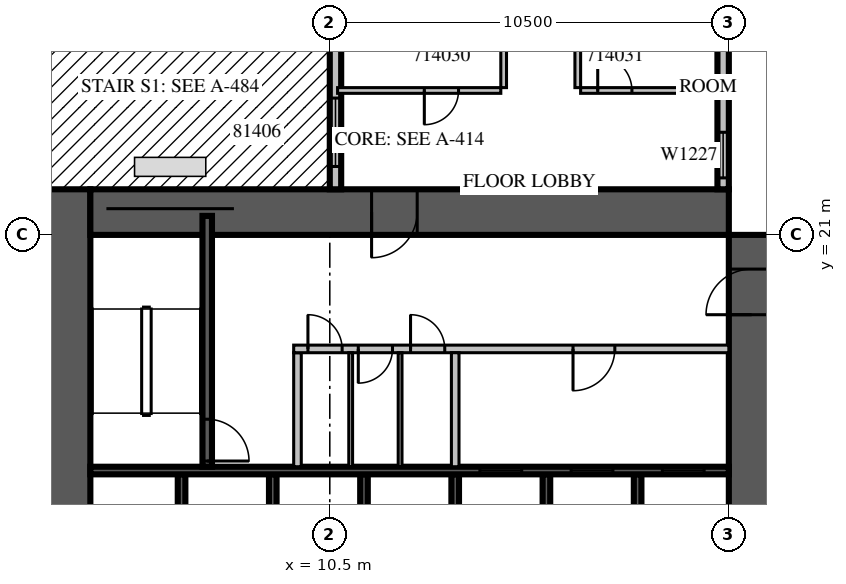
"""IFC4 building model, lengths in metres.
Left out: names, types, materials, properties, quantities, classifications, styles, units other than length and angle.
Written with IfcOpenShell. Run it as: python <this file> out.ifc"""

import sys

from ifc_helpers import new_model, si_unit, direction, frame, frame_2d, origin, place, context, subcontext, project, spatial, rectangle, extrude, source, transform, mapped, element, fill, save


model = new_model("IFC4")
c1 = context("Model", 3, precision=1e-05, world=origin(), true_north=direction((0.0, 1.0)))
c2 = subcontext(c1, "Body", "Model", "MODEL_VIEW")
j1 = project(units=[si_unit("LENGTHUNIT", "METRE"), si_unit("PLANEANGLEUNIT", "RADIAN")], contexts=[c1])
p1 = place(None, origin())
s1 = spatial("IfcSite", under=j1, at=p1, CompositionType="ELEMENT")
p2 = place(p1, origin())
s2 = spatial("IfcBuilding", under=s1, at=p2, CompositionType="ELEMENT")
p3 = place(p2, frame((0.0, 0.0, 69.9)))
s3 = spatial("IfcBuildingStorey", under=s2, at=p3, CompositionType="ELEMENT", Elevation=69.9)
m1 = source(origin(), c2, "Body", "SweptSolid", [
    extrude(rectangle(XDim=18.0, YDim=1.2, at=frame_2d((9.0, 0.0))), origin(), (0.0, 0.0, 1.0), 4.2),
])
p4 = place(p3, frame((3.6, 4.2, 0.0), z_axis=(0.0, 0.0, 1.0), x_axis=(0.0, 1.0, 0.0)))
e1 = element("IfcWall", 1, at=p4, inside=s3, PredefinedType="SHEAR", context=c2, shape_type="MappedRepresentation", body=[
    mapped(m1, transform((0.0, 0.0, 0.0), scale=1.0)),
])
m2 = source(origin(), c2, "Body", "SweptSolid", [
    extrude(rectangle(XDim=2.2, YDim=2.1, at=frame_2d((1.1, 1.05))), frame((0.0, 0.61, 0.0), z_axis=(0.0, -1.0, 0.0), x_axis=(1.0, 0.0, 0.0)), (0.0, 0.0, 1.0), 1.22),
])
p5 = place(p4, frame((4.2, 0.0, 0.0)))
e2 = element("IfcOpeningElement", 2, at=p5, cuts=e1, PredefinedType="OPENING", context=c2, shape_type="MappedRepresentation", body=[
    mapped(m2, transform((0.0, 0.0, 0.0), scale=1.0)),
])
m3 = source(origin(), c2, "Body", "SweptSolid", [
    extrude(rectangle(XDim=16.8, YDim=1.2, at=frame_2d((8.4, 0.0))), origin(), (0.0, 0.0, 1.0), 4.2),
])
p6 = place(p3, frame((21.6, 4.2, 0.0), z_axis=(0.0, 0.0, 1.0), x_axis=(0.0, 1.0, 0.0)))
e3 = element("IfcWall", 3, at=p6, inside=s3, PredefinedType="SHEAR", context=c2, shape_type="MappedRepresentation", body=[
    mapped(m3, transform((0.0, 0.0, 0.0), scale=1.0)),
])
p7 = place(p6, frame((4.2, 0.0, 0.0)))
e4 = element("IfcOpeningElement", 4, at=p7, cuts=e3, PredefinedType="OPENING", context=c2, shape_type="MappedRepresentation", body=[
    mapped(m2, transform((0.0, 0.0, 0.0), scale=1.0)),
])
m4 = source(origin(), c2, "Body", "SweptSolid", [
    extrude(rectangle(XDim=1.2, YDim=2.1, at=frame_2d((0.6, 1.05))), frame((0.0, 0.61, 0.0), z_axis=(0.0, -1.0, 0.0), x_axis=(1.0, 0.0, 0.0)), (0.0, 0.0, 1.0), 1.22),
])
p8 = place(p6, frame((14.7, 0.0, 0.0)))
e5 = element("IfcOpeningElement", 5, at=p8, cuts=e3, PredefinedType="OPENING", context=c2, shape_type="MappedRepresentation", body=[
    mapped(m4, transform((0.0, 0.0, 0.0), scale=1.0)),
])
p9 = place(p3, frame((4.2, 21.6, 0.0), z_axis=(0.0, 0.0, 1.0), x_axis=(1.0, 0.0, 0.0)))
e6 = element("IfcWall", 6, at=p9, inside=s3, PredefinedType="SHEAR", context=c2, shape_type="MappedRepresentation", body=[
    mapped(m3, transform((0.0, 0.0, 0.0), scale=1.0)),
])
p10 = place(p9, frame((7.4, 0.0, 0.0)))
e7 = element("IfcOpeningElement", 7, at=p10, cuts=e6, PredefinedType="OPENING", context=c2, shape_type="MappedRepresentation", body=[
    mapped(m4, transform((0.0, 0.0, 0.0), scale=1.0)),
])
m5 = source(origin(), c2, "Body", "SweptSolid", [
    extrude(rectangle(XDim=6.6, YDim=0.3, at=frame_2d((3.3, 0.0))), origin(), (0.0, 0.0, 1.0), 3.8),
])
p11 = place(p3, frame((20.85, 22.2, 0.0), z_axis=(0.0, 0.0, 1.0), x_axis=(0.0, 1.0, 0.0)))
e8 = element("IfcWall", 8, at=p11, inside=s3, PredefinedType="STANDARD", context=c2, shape_type="MappedRepresentation", body=[
    mapped(m5, transform((0.0, 0.0, 0.0), scale=1.0)),
])
m6 = source(origin(), c2, "Body", "SweptSolid", [
    extrude(rectangle(XDim=1.2, YDim=2.7, at=frame_2d((0.6, 1.35))), frame((0.0, 0.16, 0.0), z_axis=(0.0, -1.0, 0.0), x_axis=(1.0, 0.0, 0.0)), (0.0, 0.0, 1.0), 0.32),
])
p12 = place(p11, frame((0.3, 0.0, 0.6)))
e9 = element("IfcOpeningElement", 9, at=p12, cuts=e8, PredefinedType="OPENING", context=c2, shape_type="MappedRepresentation", body=[
    mapped(m6, transform((0.0, 0.0, 0.0), scale=1.0)),
])
m7 = source(origin(), c2, "Body", "SweptSolid", [
    extrude(rectangle(XDim=2.4, YDim=2.7, at=frame_2d((1.2, 1.35))), frame((0.0, 0.16, 0.0), z_axis=(0.0, -1.0, 0.0), x_axis=(1.0, 0.0, 0.0)), (0.0, 0.0, 1.0), 0.32),
])
p13 = place(p11, frame((3.9, 0.0, 0.6)))
e10 = element("IfcOpeningElement", 10, at=p13, cuts=e8, PredefinedType="OPENING", context=c2, shape_type="MappedRepresentation", body=[
    mapped(m7, transform((0.0, 0.0, 0.0), scale=1.0)),
])
p14 = place(p3, frame((10.65, 28.8, 0.0), z_axis=(0.0, 0.0, 1.0), x_axis=(0.0, -1.0, 0.0)))
e11 = element("IfcWall", 11, at=p14, inside=s3, PredefinedType="STANDARD", context=c2, shape_type="MappedRepresentation", body=[
    mapped(m5, transform((0.0, 0.0, 0.0), scale=1.0)),
])
m8 = source(origin(), c2, "Body", "SweptSolid", [
    extrude(rectangle(XDim=1.8, YDim=2.4, at=frame_2d((0.9, 1.2))), frame((0.0, 0.16, 0.0), z_axis=(0.0, -1.0, 0.0), x_axis=(1.0, 0.0, 0.0)), (0.0, 0.0, 1.0), 0.32),
])
p15 = place(p14, frame((0.1, 0.0, 0.0)))
e12 = element("IfcOpeningElement", 12, at=p15, cuts=e11, PredefinedType="OPENING", context=c2, shape_type="MappedRepresentation", body=[
    mapped(m8, transform((0.0, 0.0, 0.0), scale=1.0)),
])
p16 = place(p14, frame((4.2, 0.0, 0.0)))
e13 = element("IfcOpeningElement", 13, at=p16, cuts=e11, PredefinedType="OPENING", context=c2, shape_type="MappedRepresentation", body=[
    mapped(m8, transform((0.0, 0.0, 0.0), scale=1.0)),
])
m9 = source(origin(), c2, "Body", "SweptSolid", [
    extrude(rectangle(XDim=3.0, YDim=0.2, at=frame_2d((1.5, 0.0))), origin(), (0.0, 0.0, 1.0), 4.2),
])
for number, where, z_axis, x_axis in (
    (14, (6.6, 11.7, 0.0), (0.0, 0.0, 1.0), (0.0, 1.0, 0.0)),
    (15, (9.0, 11.7, 0.0), (0.0, 0.0, 1.0), (0.0, 1.0, 0.0)),
    (16, (11.4, 11.7, 0.0), (0.0, 0.0, 1.0), (0.0, 1.0, 0.0)),
    (17, (13.8, 11.7, 0.0), (0.0, 0.0, 1.0), (0.0, 1.0, 0.0)),
    (18, (16.2, 11.7, 0.0), (0.0, 0.0, 1.0), (0.0, 1.0, 0.0)),
    (19, (18.6, 11.7, 0.0), (0.0, 0.0, 1.0), (0.0, 1.0, 0.0)),
):
    element("IfcWall", number, at=place(p3, frame(where, z_axis=z_axis, x_axis=x_axis)), inside=s3, PredefinedType="SOLIDWALL", context=c2, shape_type="MappedRepresentation", body=[
        mapped(m9, transform((0.0, 0.0, 0.0), scale=1.0)),
    ])
m10 = source(origin(), c2, "Body", "SweptSolid", [
    extrude(rectangle(XDim=16.8, YDim=0.2, at=frame_2d((8.4, 0.0))), origin(), (0.0, 0.0, 1.0), 4.2),
])
p17 = place(p3, frame((4.2, 14.8, 0.0), z_axis=(0.0, 0.0, 1.0), x_axis=(1.0, 0.0, 0.0)))
e20 = element("IfcWall", 20, at=p17, inside=s3, PredefinedType="SOLIDWALL", context=c2, shape_type="MappedRepresentation", body=[
    mapped(m10, transform((0.0, 0.0, 0.0), scale=1.0)),
])
m11 = source(origin(), c2, "Body", "SweptSolid", [
    extrude(rectangle(XDim=1.1, YDim=2.1, at=frame_2d((0.55, 1.05))), frame((0.0, 0.11, 0.0), z_axis=(0.0, -1.0, 0.0), x_axis=(1.0, 0.0, 0.0)), (0.0, 0.0, 1.0), 0.22),
])
p18 = place(p17, frame((10.25, 0.0, 0.0)))
e21 = element("IfcOpeningElement", 21, at=p18, cuts=e20, PredefinedType="OPENING", context=c2, shape_type="MappedRepresentation", body=[
    mapped(m11, transform((0.0, 0.0, 0.0), scale=1.0)),
])
p19 = place(p17, frame((12.65, 0.0, 0.0)))
e22 = element("IfcOpeningElement", 22, at=p19, cuts=e20, PredefinedType="OPENING", context=c2, shape_type="MappedRepresentation", body=[
    mapped(m11, transform((0.0, 0.0, 0.0), scale=1.0)),
])
p20 = place(p17, frame((15.05, 0.0, 0.0)))
e23 = element("IfcOpeningElement", 23, at=p20, cuts=e20, PredefinedType="OPENING", context=c2, shape_type="MappedRepresentation", body=[
    mapped(m11, transform((0.0, 0.0, 0.0), scale=1.0)),
])
m12 = source(origin(), c2, "Body", "SweptSolid", [
    extrude(rectangle(XDim=6.6, YDim=0.25, at=frame_2d((3.3, 0.0))), origin(), (0.0, 0.0, 1.0), 3.8),
])
p21 = place(p3, frame((7.275, 14.9, 0.0), z_axis=(0.0, 0.0, 1.0), x_axis=(0.0, 1.0, 0.0)))
e24 = element("IfcWall", 24, at=p21, inside=s3, PredefinedType="SOLIDWALL", context=c2, shape_type="MappedRepresentation", body=[
    mapped(m12, transform((0.0, 0.0, 0.0), scale=1.0)),
])
m13 = source(origin(), c2, "Body", "SweptSolid", [
    extrude(rectangle(XDim=1.1, YDim=2.1, at=frame_2d((0.55, 1.05))), frame((0.0, 0.135, 0.0), z_axis=(0.0, -1.0, 0.0), x_axis=(1.0, 0.0, 0.0)), (0.0, 0.0, 1.0), 0.27),
])
p22 = place(p21, frame((0.15, 0.0, 0.0)))
e25 = element("IfcOpeningElement", 25, at=p22, cuts=e24, PredefinedType="OPENING", context=c2, shape_type="MappedRepresentation", body=[
    mapped(m13, transform((0.0, 0.0, 0.0), scale=1.0)),
])
m14 = source(origin(), c2, "Body", "SweptSolid", [
    extrude(rectangle(XDim=3.0, YDim=0.2, at=frame_2d((1.5, 0.0))), origin(), (0.0, 0.0, 1.0), 3.8),
])
p23 = place(p3, frame((9.65, 14.9, 0.0), z_axis=(0.0, 0.0, 1.0), x_axis=(0.0, 1.0, 0.0)))
e26 = element("IfcWall", 26, at=p23, inside=s3, PredefinedType="PARTITIONING", context=c2, shape_type="MappedRepresentation", body=[
    mapped(m14, transform((0.0, 0.0, 0.0), scale=1.0)),
])
m15 = source(origin(), c2, "Body", "SweptSolid", [
    extrude(rectangle(XDim=11.45, YDim=0.2, at=frame_2d((5.725, 0.0))), origin(), (0.0, 0.0, 1.0), 3.8),
])
p24 = place(p3, frame((9.55, 18.0, 0.0), z_axis=(0.0, 0.0, 1.0), x_axis=(1.0, 0.0, 0.0)))
e27 = element("IfcWall", 27, at=p24, inside=s3, PredefinedType="PARTITIONING", context=c2, shape_type="MappedRepresentation", body=[
    mapped(m15, transform((0.0, 0.0, 0.0), scale=1.0)),
])
m16 = source(origin(), c2, "Body", "SweptSolid", [
    extrude(rectangle(XDim=0.9, YDim=2.1, at=frame_2d((0.45, 1.05))), frame((0.0, 0.11, 0.0), z_axis=(0.0, -1.0, 0.0), x_axis=(1.0, 0.0, 0.0)), (0.0, 0.0, 1.0), 0.22),
])
p25 = place(p24, frame((0.375, 0.0, 0.0)))
e28 = element("IfcOpeningElement", 28, at=p25, cuts=e27, PredefinedType="OPENING", context=c2, shape_type="MappedRepresentation", body=[
    mapped(m16, transform((0.0, 0.0, 0.0), scale=1.0)),
])
p26 = place(p24, frame((1.7, 0.0, 0.0)))
e29 = element("IfcOpeningElement", 29, at=p26, cuts=e27, PredefinedType="OPENING", context=c2, shape_type="MappedRepresentation", body=[
    mapped(m16, transform((0.0, 0.0, 0.0), scale=1.0)),
])
p27 = place(p24, frame((3.075, 0.0, 0.0)))
e30 = element("IfcOpeningElement", 30, at=p27, cuts=e27, PredefinedType="OPENING", context=c2, shape_type="MappedRepresentation", body=[
    mapped(m16, transform((0.0, 0.0, 0.0), scale=1.0)),
])
p28 = place(p24, frame((7.35, 0.0, 0.0)))
e31 = element("IfcOpeningElement", 31, at=p28, cuts=e27, PredefinedType="OPENING", context=c2, shape_type="MappedRepresentation", body=[
    mapped(m11, transform((0.0, 0.0, 0.0), scale=1.0)),
])
p29 = place(p3, frame((13.8, 14.9, 0.0), z_axis=(0.0, 0.0, 1.0), x_axis=(0.0, 1.0, 0.0)))
e32 = element("IfcWall", 32, at=p29, inside=s3, PredefinedType="PARTITIONING", context=c2, shape_type="MappedRepresentation", body=[
    mapped(m14, transform((0.0, 0.0, 0.0), scale=1.0)),
])
m17 = source(origin(), c2, "Body", "SweptSolid", [
    extrude(rectangle(XDim=3.0, YDim=0.1, at=frame_2d((1.5, 0.0))), origin(), (0.0, 0.0, 1.0), 3.8),
])
for number, where, z_axis, x_axis in (
    (33, (11.05, 14.9, 0.0), (0.0, 0.0, 1.0), (0.0, 1.0, 0.0)),
    (34, (12.35, 14.9, 0.0), (0.0, 0.0, 1.0), (0.0, 1.0, 0.0)),
):
    element("IfcWall", number, at=place(p3, frame(where, z_axis=z_axis, x_axis=x_axis)), inside=s3, PredefinedType="PARTITIONING", context=c2, shape_type="MappedRepresentation", body=[
        mapped(m17, transform((0.0, 0.0, 0.0), scale=1.0)),
    ])
m18 = source(origin(), c2, "Body", "SweptSolid", [
    extrude(rectangle(XDim=4.295, YDim=0.15, at=frame_2d((2.147, 0.0))), origin(), (0.0, 0.0, 1.0), 3.8),
])
p30 = place(p3, frame((10.705, 24.8, 0.0), z_axis=(0.0, 0.0, 1.0), x_axis=(1.0, 0.0, 0.0)))
e35 = element("IfcWall", 35, at=p30, inside=s3, PredefinedType="PARTITIONING", context=c2, shape_type="MappedRepresentation", body=[
    mapped(m18, transform((0.0, 0.0, 0.0), scale=1.0)),
])
m19 = source(origin(), c2, "Body", "SweptSolid", [
    extrude(rectangle(XDim=0.9, YDim=2.1, at=frame_2d((0.45, 1.05))), frame((0.0, 0.085, 0.0), z_axis=(0.0, -1.0, 0.0), x_axis=(1.0, 0.0, 0.0)), (0.0, 0.0, 1.0), 0.17),
])
p31 = place(p30, frame((2.283, 0.0, 0.0)))
e36 = element("IfcOpeningElement", 36, at=p31, cuts=e35, PredefinedType="OPENING", context=c2, shape_type="MappedRepresentation", body=[
    mapped(m19, transform((0.0, 0.0, 0.0), scale=1.0)),
])
m20 = source(origin(), c2, "Body", "SweptSolid", [
    extrude(rectangle(XDim=3.6, YDim=0.15, at=frame_2d((1.8, 0.0))), origin(), (0.0, 0.0, 1.0), 3.8),
])
p32 = place(p3, frame((17.1, 24.8, 0.0), z_axis=(0.0, 0.0, 1.0), x_axis=(1.0, 0.0, 0.0)))
e37 = element("IfcWall", 37, at=p32, inside=s3, PredefinedType="PARTITIONING", context=c2, shape_type="MappedRepresentation", body=[
    mapped(m20, transform((0.0, 0.0, 0.0), scale=1.0)),
])
p33 = place(p32, frame((0.45, 0.0, 0.0)))
e38 = element("IfcOpeningElement", 38, at=p33, cuts=e37, PredefinedType="OPENING", context=c2, shape_type="MappedRepresentation", body=[
    mapped(m19, transform((0.0, 0.0, 0.0), scale=1.0)),
])
m21 = source(origin(), c2, "Body", "SweptSolid", [
    extrude(rectangle(XDim=4.45, YDim=0.15, at=frame_2d((2.225, 0.0))), origin(), (0.0, 0.0, 1.0), 3.8),
])
for number, where, z_axis, x_axis in (
    (39, (15.075, 24.875, 0.0), (0.0, 0.0, 1.0), (0.0, 1.0, 0.0)),
    (40, (17.025, 29.325, 0.0), (0.0, 0.0, 1.0), (0.0, -1.0, 0.0)),
):
    element("IfcWall", number, at=place(p3, frame(where, z_axis=z_axis, x_axis=x_axis)), inside=s3, PredefinedType="PARTITIONING", context=c2, shape_type="MappedRepresentation", body=[
        mapped(m21, transform((0.0, 0.0, 0.0), scale=1.0)),
    ])
m22 = source(origin(), c2, "Body", "SweptSolid", [
    extrude(rectangle(XDim=1.2, YDim=2.7, at=frame_2d((0.6, 1.35))), frame((0.0, 0.03, 0.0), z_axis=(0.0, -1.0, 0.0), x_axis=(1.0, 0.0, 0.0)), (0.0, 0.0, 1.0), 0.06),
])
p34 = place(p12, origin())
e41 = element("IfcWindow", 41, at=p34, inside=s3, PartitioningType="SINGLE_PANEL", PredefinedType="WINDOW", context=c2, shape_type="MappedRepresentation", body=[
    mapped(m22, transform((0.0, 0.0, 0.0), scale=1.0)),
])
fill(e9, e41)
m23 = source(origin(), c2, "Body", "SweptSolid", [
    extrude(rectangle(XDim=1.8, YDim=2.4, at=frame_2d((0.9, 1.2))), frame((0.0, 0.025, 0.0), z_axis=(0.0, -1.0, 0.0), x_axis=(1.0, 0.0, 0.0)), (0.0, 0.0, 1.0), 0.05),
])
p35 = place(p16, origin())
e42 = element("IfcDoor", 42, at=p35, inside=s3, OperationType="SLIDING_TO_LEFT", PredefinedType="DOOR", context=c2, shape_type="MappedRepresentation", body=[
    mapped(m23, transform((0.0, 0.0, 0.0), scale=1.0)),
])
fill(e13, e42)
m24 = source(origin(), c2, "Body", "SweptSolid", [
    extrude(rectangle(XDim=1.1, YDim=2.1, at=frame_2d((0.55, 1.05))), frame((0.0, 0.025, 0.0), z_axis=(0.0, -1.0, 0.0), x_axis=(1.0, 0.0, 0.0)), (0.0, 0.0, 1.0), 0.05),
])
p36 = place(p18, origin())
e43 = element("IfcDoor", 43, at=p36, inside=s3, OperationType="SLIDING_TO_LEFT", PredefinedType="DOOR", context=c2, shape_type="MappedRepresentation", body=[
    mapped(m24, transform((0.0, 0.0, 0.0), scale=1.0)),
])
fill(e21, e43)
p37 = place(p19, origin())
e44 = element("IfcDoor", 44, at=p37, inside=s3, OperationType="SLIDING_TO_LEFT", PredefinedType="DOOR", context=c2, shape_type="MappedRepresentation", body=[
    mapped(m24, transform((0.0, 0.0, 0.0), scale=1.0)),
])
fill(e22, e44)
p38 = place(p20, origin())
e45 = element("IfcDoor", 45, at=p38, inside=s3, OperationType="SLIDING_TO_LEFT", PredefinedType="DOOR", context=c2, shape_type="MappedRepresentation", body=[
    mapped(m24, transform((0.0, 0.0, 0.0), scale=1.0)),
])
fill(e23, e45)
p39 = place(p22, origin())
e46 = element("IfcDoor", 46, at=p39, inside=s3, OperationType="SINGLE_SWING_RIGHT", PredefinedType="DOOR", context=c2, shape_type="MappedRepresentation", body=[
    mapped(m24, transform((0.0, 0.0, 0.0), scale=1.0)),
])
fill(e25, e46)
m25 = source(origin(), c2, "Body", "SweptSolid", [
    extrude(rectangle(XDim=0.9, YDim=2.1, at=frame_2d((0.45, 1.05))), frame((0.0, 0.025, 0.0), z_axis=(0.0, -1.0, 0.0), x_axis=(1.0, 0.0, 0.0)), (0.0, 0.0, 1.0), 0.05),
])
p40 = place(p25, origin())
e47 = element("IfcDoor", 47, at=p40, inside=s3, OperationType="SINGLE_SWING_LEFT", PredefinedType="DOOR", context=c2, shape_type="MappedRepresentation", body=[
    mapped(m25, transform((0.0, 0.0, 0.0), scale=1.0)),
])
fill(e28, e47)
p41 = place(p26, origin())
e48 = element("IfcDoor", 48, at=p41, inside=s3, OperationType="SINGLE_SWING_RIGHT", PredefinedType="DOOR", context=c2, shape_type="MappedRepresentation", body=[
    mapped(m25, transform((0.0, 0.0, 0.0), scale=1.0)),
])
fill(e29, e48)
p42 = place(p27, origin())
e49 = element("IfcDoor", 49, at=p42, inside=s3, OperationType="SINGLE_SWING_LEFT", PredefinedType="DOOR", context=c2, shape_type="MappedRepresentation", body=[
    mapped(m25, transform((0.0, 0.0, 0.0), scale=1.0)),
])
fill(e30, e49)
p43 = place(p28, origin())
e50 = element("IfcDoor", 50, at=p43, inside=s3, OperationType="SINGLE_SWING_RIGHT", PredefinedType="DOOR", context=c2, shape_type="MappedRepresentation", body=[
    mapped(m24, transform((0.0, 0.0, 0.0), scale=1.0)),
])
fill(e31, e50)
m26 = source(origin(), c2, "Body", "SweptSolid", [
    extrude(rectangle(XDim=1.2, YDim=2.1, at=frame_2d((0.6, 1.05))), frame((0.0, 0.025, 0.0), z_axis=(0.0, -1.0, 0.0), x_axis=(1.0, 0.0, 0.0)), (0.0, 0.0, 1.0), 0.05),
])
p44 = place(p10, origin())
e51 = element("IfcDoor", 51, at=p44, inside=s3, OperationType="SINGLE_SWING_RIGHT", PredefinedType="DOOR", context=c2, shape_type="MappedRepresentation", body=[
    mapped(m26, transform((0.0, 0.0, 0.0), scale=1.0)),
])
fill(e7, e51)
p45 = place(p8, origin())
e52 = element("IfcDoor", 52, at=p45, inside=s3, OperationType="SINGLE_SWING_LEFT", PredefinedType="DOOR", context=c2, shape_type="MappedRepresentation", body=[
    mapped(m26, transform((0.0, 0.0, 0.0), scale=1.0)),
])
fill(e5, e52)
p46 = place(p31, origin())
e53 = element("IfcDoor", 53, at=p46, inside=s3, OperationType="SINGLE_SWING_RIGHT", PredefinedType="DOOR", context=c2, shape_type="MappedRepresentation", body=[
    mapped(m25, transform((0.0, 0.0, 0.0), scale=1.0)),
])
fill(e36, e53)
p47 = place(p33, origin())
e54 = element("IfcDoor", 54, at=p47, inside=s3, OperationType="SINGLE_SWING_LEFT", PredefinedType="DOOR", context=c2, shape_type="MappedRepresentation", body=[
    mapped(m25, transform((0.0, 0.0, 0.0), scale=1.0)),
])
fill(e38, e54)
save(model, sys.argv[1])
